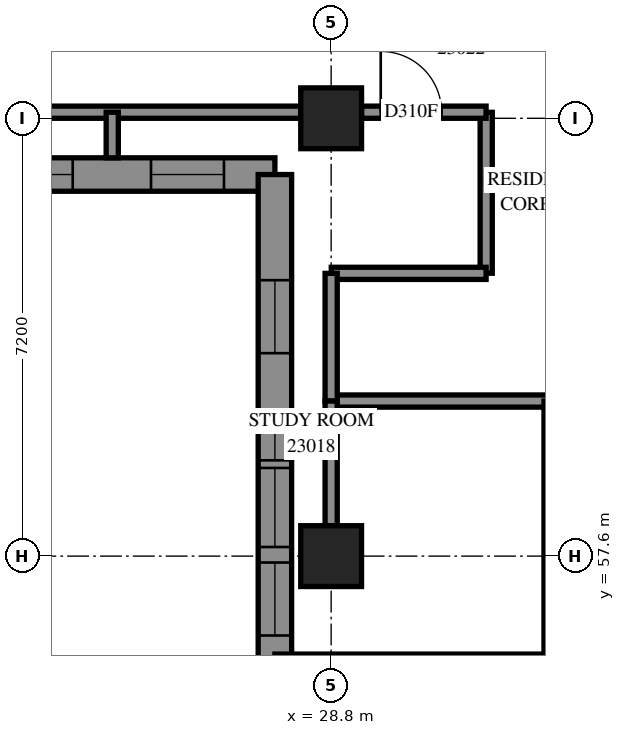
"""IFC4 building model, lengths in metres.
Left out: names, types, materials, properties, quantities, classifications, styles, units other than length and angle.
Written with IfcOpenShell. Run it as: python <this file> out.ifc"""

import sys

from ifc_helpers import new_model, si_unit, direction, frame, frame_2d, origin, origin_2d, place, context, subcontext, project, spatial, polyline, rectangle, outline, extrude, element, fill, save


model = new_model("IFC4")
c1 = context("Model", 3, precision=1e-05, world=origin(), true_north=direction((0.0, 1.0)))
c2 = subcontext(c1, "Body", "Model", "MODEL_VIEW")
j1 = project(units=[si_unit("LENGTHUNIT", "METRE"), si_unit("PLANEANGLEUNIT", "RADIAN")], contexts=[c1])
p1 = place(None, origin())
s1 = spatial("IfcSite", under=j1, at=p1, CompositionType="ELEMENT")
p2 = place(p1, origin())
s2 = spatial("IfcBuilding", under=s1, at=p2, CompositionType="ELEMENT")
p3 = place(p2, frame((0.0, 0.0, 88.0)))
s3 = spatial("IfcBuildingStorey", under=s2, at=p3, CompositionType="ELEMENT", Elevation=88.0)
for number, where, z_axis, x_axis in (
    (1, (28.8, 57.6, 0.0), (0.0, 0.0, 1.0), (1.0, 0.0, 0.0)),
    (2, (28.8, 64.8, 0.0), (0.0, 0.0, 1.0), (1.0, 0.0, 0.0)),
):
    element("IfcColumn", number, at=place(p3, frame(where, z_axis=z_axis, x_axis=x_axis)), inside=s3, PredefinedType="COLUMN", context=c2, shape_type="SweptSolid", body=[
        extrude(rectangle(XDim=1.0, YDim=1.0, at=origin_2d()), origin(), (0.0, 0.0, 1.0), 3.1),
    ])
p4 = place(p3, frame((19.714, 63.875, 0.0), z_axis=(0.0, 0.0, 1.0), x_axis=(1.0, 0.0, 0.0)))
e3 = element("IfcWall", 3, at=p4, inside=s3, PredefinedType="SOLIDWALL", context=c2, shape_type="SweptSolid", body=[
    extrude(outline(polyline([(-0.275, -0.275), (7.886, -0.275), (8.436, 0.275), (0.275, 0.275), (-0.275, -0.275)])), origin(), (0.0, 0.0, 1.0), 3.1),
])
p5 = place(p4, frame((2.036, 0.0, 0.5)))
e4 = element("IfcOpeningElement", 4, at=p5, cuts=e3, PredefinedType="OPENING", context=c2, shape_type="SweptSolid", body=[
    extrude(rectangle(XDim=1.3, YDim=2.45, at=frame_2d((0.65, 1.225))), frame((0.0, 0.285, 0.0), z_axis=(0.0, -1.0, 0.0), x_axis=(1.0, 0.0, 0.0)), (0.0, 0.0, 1.0), 0.57),
])
p6 = place(p4, frame((3.536, 0.0, 0.5)))
e5 = element("IfcOpeningElement", 5, at=p6, cuts=e3, PredefinedType="OPENING", context=c2, shape_type="SweptSolid", body=[
    extrude(rectangle(XDim=1.3, YDim=2.45, at=frame_2d((0.65, 1.225))), frame((0.0, 0.285, 0.0), z_axis=(0.0, -1.0, 0.0), x_axis=(1.0, 0.0, 0.0)), (0.0, 0.0, 1.0), 0.57),
])
p7 = place(p4, frame((0.581, 0.0, 0.5)))
e6 = element("IfcOpeningElement", 6, at=p7, cuts=e3, PredefinedType="OPENING", context=c2, shape_type="SweptSolid", body=[
    extrude(rectangle(XDim=1.2, YDim=2.45, at=frame_2d((0.6, 1.225))), frame((0.0, 0.285, 0.0), z_axis=(0.0, -1.0, 0.0), x_axis=(1.0, 0.0, 0.0)), (0.0, 0.0, 1.0), 0.57),
])
p8 = place(p4, frame((6.123, 0.0, 0.5)))
e7 = element("IfcOpeningElement", 7, at=p8, cuts=e3, PredefinedType="OPENING", context=c2, shape_type="SweptSolid", body=[
    extrude(rectangle(XDim=1.2, YDim=2.45, at=frame_2d((0.6, 1.225))), frame((0.0, 0.285, 0.0), z_axis=(0.0, -1.0, 0.0), x_axis=(1.0, 0.0, 0.0)), (0.0, 0.0, 1.0), 0.57),
])
p9 = place(p3, frame((27.875, 63.875, 0.0), z_axis=(0.0, 0.0, 1.0), x_axis=(0.0, -1.0, 0.0)))
e8 = element("IfcWall", 8, at=p9, inside=s3, PredefinedType="SOLIDWALL", context=c2, shape_type="SweptSolid", body=[
    extrude(outline(polyline([(0.275, -0.275), (8.436, -0.275), (7.886, 0.275), (-0.275, 0.275), (0.275, -0.275)])), origin(), (0.0, 0.0, 1.0), 3.1),
])
p10 = place(p9, frame((4.825, 0.0, 0.5)))
e9 = element("IfcOpeningElement", 9, at=p10, cuts=e8, PredefinedType="OPENING", context=c2, shape_type="SweptSolid", body=[
    extrude(rectangle(XDim=1.3, YDim=2.45, at=frame_2d((0.65, 1.225))), frame((0.0, 0.285, 0.0), z_axis=(0.0, -1.0, 0.0), x_axis=(1.0, 0.0, 0.0)), (0.0, 0.0, 1.0), 0.57),
])
p11 = place(p9, frame((1.738, 0.0, 0.5)))
e10 = element("IfcOpeningElement", 10, at=p11, cuts=e8, PredefinedType="OPENING", context=c2, shape_type="SweptSolid", body=[
    extrude(rectangle(XDim=1.2, YDim=2.45, at=frame_2d((0.6, 1.225))), frame((0.0, 0.285, 0.0), z_axis=(0.0, -1.0, 0.0), x_axis=(1.0, 0.0, 0.0)), (0.0, 0.0, 1.0), 0.57),
])
p12 = place(p9, frame((6.38, 0.0, 0.5)))
e11 = element("IfcOpeningElement", 11, at=p12, cuts=e8, PredefinedType="OPENING", context=c2, shape_type="SweptSolid", body=[
    extrude(rectangle(XDim=1.2, YDim=2.45, at=frame_2d((0.6, 1.225))), frame((0.0, 0.285, 0.0), z_axis=(0.0, -1.0, 0.0), x_axis=(1.0, 0.0, 0.0)), (0.0, 0.0, 1.0), 0.57),
])
p13 = place(p9, frame((3.9, 0.0, 0.45)))
e12 = element("IfcOpeningElement", 12, at=p13, cuts=e8, PredefinedType="OPENING", context=c2, shape_type="SweptSolid", body=[
    extrude(rectangle(XDim=0.8, YDim=2.5, at=frame_2d((0.4, 1.25))), frame((0.0, 0.285, 0.0), z_axis=(0.0, -1.0, 0.0), x_axis=(1.0, 0.0, 0.0)), (0.0, 0.0, 1.0), 0.57),
])
p14 = place(p3, frame((27.875, 55.714, 0.0), z_axis=(0.0, 0.0, 1.0), x_axis=(1.0, 0.0, 0.0)))
e13 = element("IfcWall", 13, at=p14, inside=s3, PredefinedType="SOLIDWALL", context=c2, shape_type="SweptSolid", body=[
    extrude(outline(polyline([(-0.275, -0.275), (14.125, -0.275), (14.675, 0.275), (0.275, 0.275), (-0.275, -0.275)])), origin(), (0.0, 0.0, 1.0), 3.1),
])
p15 = place(p14, frame((1.175, 0.0, 0.5)))
e14 = element("IfcOpeningElement", 14, at=p15, cuts=e13, PredefinedType="OPENING", context=c2, shape_type="SweptSolid", body=[
    extrude(rectangle(XDim=1.3, YDim=2.45, at=frame_2d((0.65, 1.225))), frame((0.0, 0.285, 0.0), z_axis=(0.0, -1.0, 0.0), x_axis=(1.0, 0.0, 0.0)), (0.0, 0.0, 1.0), 0.57),
])
p16 = place(p14, frame((2.675, 0.0, 0.5)))
e15 = element("IfcOpeningElement", 15, at=p16, cuts=e13, PredefinedType="OPENING", context=c2, shape_type="SweptSolid", body=[
    extrude(rectangle(XDim=1.3, YDim=2.45, at=frame_2d((0.65, 1.225))), frame((0.0, 0.285, 0.0), z_axis=(0.0, -1.0, 0.0), x_axis=(1.0, 0.0, 0.0)), (0.0, 0.0, 1.0), 0.57),
])
p17 = place(p14, frame((4.925, 0.0, 0.5)))
e16 = element("IfcOpeningElement", 16, at=p17, cuts=e13, PredefinedType="OPENING", context=c2, shape_type="SweptSolid", body=[
    extrude(rectangle(XDim=1.3, YDim=2.45, at=frame_2d((0.65, 1.225))), frame((0.0, 0.285, 0.0), z_axis=(0.0, -1.0, 0.0), x_axis=(1.0, 0.0, 0.0)), (0.0, 0.0, 1.0), 0.57),
])
p18 = place(p14, frame((6.425, 0.0, 0.5)))
e17 = element("IfcOpeningElement", 17, at=p18, cuts=e13, PredefinedType="OPENING", context=c2, shape_type="SweptSolid", body=[
    extrude(rectangle(XDim=1.3, YDim=2.45, at=frame_2d((0.65, 1.225))), frame((0.0, 0.285, 0.0), z_axis=(0.0, -1.0, 0.0), x_axis=(1.0, 0.0, 0.0)), (0.0, 0.0, 1.0), 0.57),
])
p19 = place(p14, frame((8.275, 0.0, 0.5)))
e18 = element("IfcOpeningElement", 18, at=p19, cuts=e13, PredefinedType="OPENING", context=c2, shape_type="SweptSolid", body=[
    extrude(rectangle(XDim=1.3, YDim=2.45, at=frame_2d((0.65, 1.225))), frame((0.0, 0.285, 0.0), z_axis=(0.0, -1.0, 0.0), x_axis=(1.0, 0.0, 0.0)), (0.0, 0.0, 1.0), 0.57),
])
p20 = place(p14, frame((9.775, 0.0, 0.5)))
e19 = element("IfcOpeningElement", 19, at=p20, cuts=e13, PredefinedType="OPENING", context=c2, shape_type="SweptSolid", body=[
    extrude(rectangle(XDim=1.3, YDim=2.45, at=frame_2d((0.65, 1.225))), frame((0.0, 0.285, 0.0), z_axis=(0.0, -1.0, 0.0), x_axis=(1.0, 0.0, 0.0)), (0.0, 0.0, 1.0), 0.57),
])
p21 = place(p14, frame((12.363, 0.0, 0.5)))
e20 = element("IfcOpeningElement", 20, at=p21, cuts=e13, PredefinedType="OPENING", context=c2, shape_type="SweptSolid", body=[
    extrude(rectangle(XDim=1.2, YDim=2.45, at=frame_2d((0.6, 1.225))), frame((0.0, 0.285, 0.0), z_axis=(0.0, -1.0, 0.0), x_axis=(1.0, 0.0, 0.0)), (0.0, 0.0, 1.0), 0.57),
])
p22 = place(p3, frame((28.8, 60.15, 0.0), z_axis=(0.0, 0.0, 1.0), x_axis=(1.0, 0.0, 0.0)))
e21 = element("IfcWall", 21, at=p22, inside=s3, PredefinedType="PARTITIONING", context=c2, shape_type="SweptSolid", body=[
    extrude(rectangle(XDim=24.15, YDim=0.2, at=frame_2d((12.075, 0.0))), origin(), (0.0, 0.0, 1.0), 3.1),
])
p23 = place(p22, frame((11.325, 0.0, 0.0)))
e22 = element("IfcOpeningElement", 22, at=p23, cuts=e21, PredefinedType="OPENING", context=c2, shape_type="SweptSolid", body=[
    extrude(rectangle(XDim=1.0, YDim=2.1, at=frame_2d((0.5, 1.05))), frame((0.0, 0.11, 0.0), z_axis=(0.0, -1.0, 0.0), x_axis=(1.0, 0.0, 0.0)), (0.0, 0.0, 1.0), 0.22),
])
p24 = place(p22, frame((14.8, 0.0, 0.0)))
e23 = element("IfcOpeningElement", 23, at=p24, cuts=e21, PredefinedType="OPENING", context=c2, shape_type="SweptSolid", body=[
    extrude(rectangle(XDim=0.9, YDim=2.1, at=frame_2d((0.45, 1.05))), frame((0.0, 0.11, 0.0), z_axis=(0.0, -1.0, 0.0), x_axis=(1.0, 0.0, 0.0)), (0.0, 0.0, 1.0), 0.22),
])
p25 = place(p22, frame((18.508, 0.0, 0.0)))
e24 = element("IfcOpeningElement", 24, at=p25, cuts=e21, PredefinedType="OPENING", context=c2, shape_type="SweptSolid", body=[
    extrude(rectangle(XDim=1.0, YDim=2.1, at=frame_2d((0.5, 1.05))), frame((0.0, 0.11, 0.0), z_axis=(0.0, -1.0, 0.0), x_axis=(1.0, 0.0, 0.0)), (0.0, 0.0, 1.0), 0.22),
])
p26 = place(p22, frame((22.882, 0.0, 0.0)))
e25 = element("IfcOpeningElement", 25, at=p26, cuts=e21, PredefinedType="OPENING", context=c2, shape_type="SweptSolid", body=[
    extrude(rectangle(XDim=1.0, YDim=2.1, at=frame_2d((0.5, 1.05))), frame((0.0, 0.11, 0.0), z_axis=(0.0, -1.0, 0.0), x_axis=(1.0, 0.0, 0.0)), (0.0, 0.0, 1.0), 0.22),
])
p27 = place(p3, frame((22.1, 64.9, 0.0), z_axis=(0.0, 0.0, 1.0), x_axis=(1.0, 0.0, 0.0)))
e26 = element("IfcWall", 26, at=p27, inside=s3, PredefinedType="PARTITIONING", context=c2, shape_type="SweptSolid", body=[
    extrude(rectangle(XDim=6.2, YDim=0.2, at=frame_2d((3.1, 0.0))), origin(), (0.0, 0.0, 1.0), 2.6),
])
p28 = place(p3, frame((32.4, 55.989, 0.0), z_axis=(0.0, 0.0, 1.0), x_axis=(0.0, 1.0, 0.0)))
e27 = element("IfcWall", 27, at=p28, inside=s3, PredefinedType="PARTITIONING", context=c2, shape_type="SweptSolid", body=[
    extrude(rectangle(XDim=4.161, YDim=0.2, at=frame_2d((2.08, 0.0))), origin(), (0.0, 0.0, 1.0), 3.1),
])
p29 = place(p3, frame((31.35, 62.252, 0.0), z_axis=(0.0, 0.0, 1.0), x_axis=(0.0, 1.0, 0.0)))
e28 = element("IfcWall", 28, at=p29, inside=s3, PredefinedType="PARTITIONING", context=c2, shape_type="SweptSolid", body=[
    extrude(rectangle(XDim=2.646, YDim=0.2, at=frame_2d((1.323, 0.0))), origin(), (0.0, 0.0, 1.0), 3.1),
])
p30 = place(p3, frame((28.802, 62.25, 0.0), z_axis=(0.0, 0.0, 1.0), x_axis=(1.0, 0.0, 0.0)))
e29 = element("IfcWall", 29, at=p30, inside=s3, PredefinedType="PARTITIONING", context=c2, shape_type="SweptSolid", body=[
    extrude(rectangle(XDim=2.546, YDim=0.2, at=frame_2d((1.273, 0.0))), origin(), (0.0, 0.0, 1.0), 3.1),
])
p31 = place(p3, frame((28.8, 60.15, 0.0), z_axis=(0.0, 0.0, 1.0), x_axis=(0.0, 1.0, 0.0)))
e30 = element("IfcWall", 30, at=p31, inside=s3, PredefinedType="PARTITIONING", context=c2, shape_type="SweptSolid", body=[
    extrude(rectangle(XDim=2.1, YDim=0.2, at=frame_2d((1.05, 0.0))), origin(), (0.0, 0.0, 1.0), 2.6),
])
p32 = place(p3, frame((28.8, 58.1, 0.0), z_axis=(0.0, 0.0, 1.0), x_axis=(0.0, 1.0, 0.0)))
e31 = element("IfcWall", 31, at=p32, inside=s3, PredefinedType="PARTITIONING", context=c2, shape_type="SweptSolid", body=[
    extrude(rectangle(XDim=2.05, YDim=0.2, at=frame_2d((1.025, 0.0))), origin(), (0.0, 0.0, 1.0), 2.6),
])
p33 = place(p3, frame((29.3, 64.9, 0.0), z_axis=(0.0, 0.0, 1.0), x_axis=(1.0, 0.0, 0.0)))
e32 = element("IfcWall", 32, at=p33, inside=s3, PredefinedType="PARTITIONING", context=c2, shape_type="SweptSolid", body=[
    extrude(rectangle(XDim=2.048, YDim=0.2, at=frame_2d((1.024, 0.0))), origin(), (0.0, 0.0, 1.0), 3.1),
])
p34 = place(p33, frame((0.316, 0.0, 0.0)))
e33 = element("IfcOpeningElement", 33, at=p34, cuts=e32, PredefinedType="OPENING", context=c2, shape_type="SweptSolid", body=[
    extrude(rectangle(XDim=1.0, YDim=2.1, at=frame_2d((0.5, 1.05))), frame((0.0, 0.11, 0.0), z_axis=(0.0, -1.0, 0.0), x_axis=(1.0, 0.0, 0.0)), (0.0, 0.0, 1.0), 0.22),
])
p35 = place(p3, frame((25.2, 64.15, 0.0), z_axis=(0.0, 0.0, 1.0), x_axis=(0.0, 1.0, 0.0)))
e34 = element("IfcWall", 34, at=p35, inside=s3, PredefinedType="PARTITIONING", context=c2, shape_type="SweptSolid", body=[
    extrude(rectangle(XDim=0.75, YDim=0.2, at=frame_2d((0.375, 0.0))), origin(), (0.0, 0.0, 1.0), 3.1),
])
p36 = place(p6, origin())
e35 = element("IfcWindow", 35, at=p36, inside=s3, PartitioningType="SINGLE_PANEL", PredefinedType="WINDOW", context=c2, shape_type="SweptSolid", body=[
    extrude(rectangle(XDim=1.3, YDim=2.45, at=frame_2d((0.65, 1.225))), frame((0.0, 0.155, 0.0), z_axis=(0.0, -1.0, 0.0), x_axis=(1.0, 0.0, 0.0)), (0.0, 0.0, 1.0), 0.06),
])
fill(e5, e35)
p37 = place(p8, origin())
e36 = element("IfcWindow", 36, at=p37, inside=s3, PartitioningType="SINGLE_PANEL", PredefinedType="WINDOW", context=c2, shape_type="SweptSolid", body=[
    extrude(rectangle(XDim=1.2, YDim=2.45, at=frame_2d((0.6, 1.225))), frame((0.0, 0.155, 0.0), z_axis=(0.0, -1.0, 0.0), x_axis=(1.0, 0.0, 0.0)), (0.0, 0.0, 1.0), 0.06),
])
fill(e7, e36)
p38 = place(p10, origin())
e37 = element("IfcWindow", 37, at=p38, inside=s3, PartitioningType="SINGLE_PANEL", PredefinedType="WINDOW", context=c2, shape_type="SweptSolid", body=[
    extrude(rectangle(XDim=1.3, YDim=2.45, at=frame_2d((0.65, 1.225))), frame((0.0, 0.155, 0.0), z_axis=(0.0, -1.0, 0.0), x_axis=(1.0, 0.0, 0.0)), (0.0, 0.0, 1.0), 0.06),
])
fill(e9, e37)
p39 = place(p11, origin())
e38 = element("IfcWindow", 38, at=p39, inside=s3, PartitioningType="SINGLE_PANEL", PredefinedType="WINDOW", context=c2, shape_type="SweptSolid", body=[
    extrude(rectangle(XDim=1.2, YDim=2.45, at=frame_2d((0.6, 1.225))), frame((0.0, 0.155, 0.0), z_axis=(0.0, -1.0, 0.0), x_axis=(1.0, 0.0, 0.0)), (0.0, 0.0, 1.0), 0.06),
])
fill(e10, e38)
p40 = place(p12, origin())
e39 = element("IfcWindow", 39, at=p40, inside=s3, PartitioningType="SINGLE_PANEL", PredefinedType="WINDOW", context=c2, shape_type="SweptSolid", body=[
    extrude(rectangle(XDim=1.2, YDim=2.45, at=frame_2d((0.6, 1.225))), frame((0.0, 0.155, 0.0), z_axis=(0.0, -1.0, 0.0), x_axis=(1.0, 0.0, 0.0)), (0.0, 0.0, 1.0), 0.06),
])
fill(e11, e39)
p41 = place(p34, origin())
e40 = element("IfcDoor", 40, at=p41, inside=s3, OperationType="SINGLE_SWING_RIGHT", PredefinedType="DOOR", context=c2, shape_type="SweptSolid", body=[
    extrude(rectangle(XDim=1.0, YDim=2.1, at=frame_2d((0.5, 1.05))), frame((0.0, 0.025, 0.0), z_axis=(0.0, -1.0, 0.0), x_axis=(1.0, 0.0, 0.0)), (0.0, 0.0, 1.0), 0.05),
])
fill(e33, e40)
p42 = place(p13, origin())
e41 = element("IfcWindow", 41, at=p42, inside=s3, PartitioningType="SINGLE_PANEL", PredefinedType="WINDOW", context=c2, shape_type="SweptSolid", body=[
    extrude(rectangle(XDim=0.8, YDim=2.5, at=frame_2d((0.4, 1.25))), frame((0.0, 0.155, 0.0), z_axis=(0.0, -1.0, 0.0), x_axis=(1.0, 0.0, 0.0)), (0.0, 0.0, 1.0), 0.06),
])
fill(e12, e41)
save(model, sys.argv[1])
